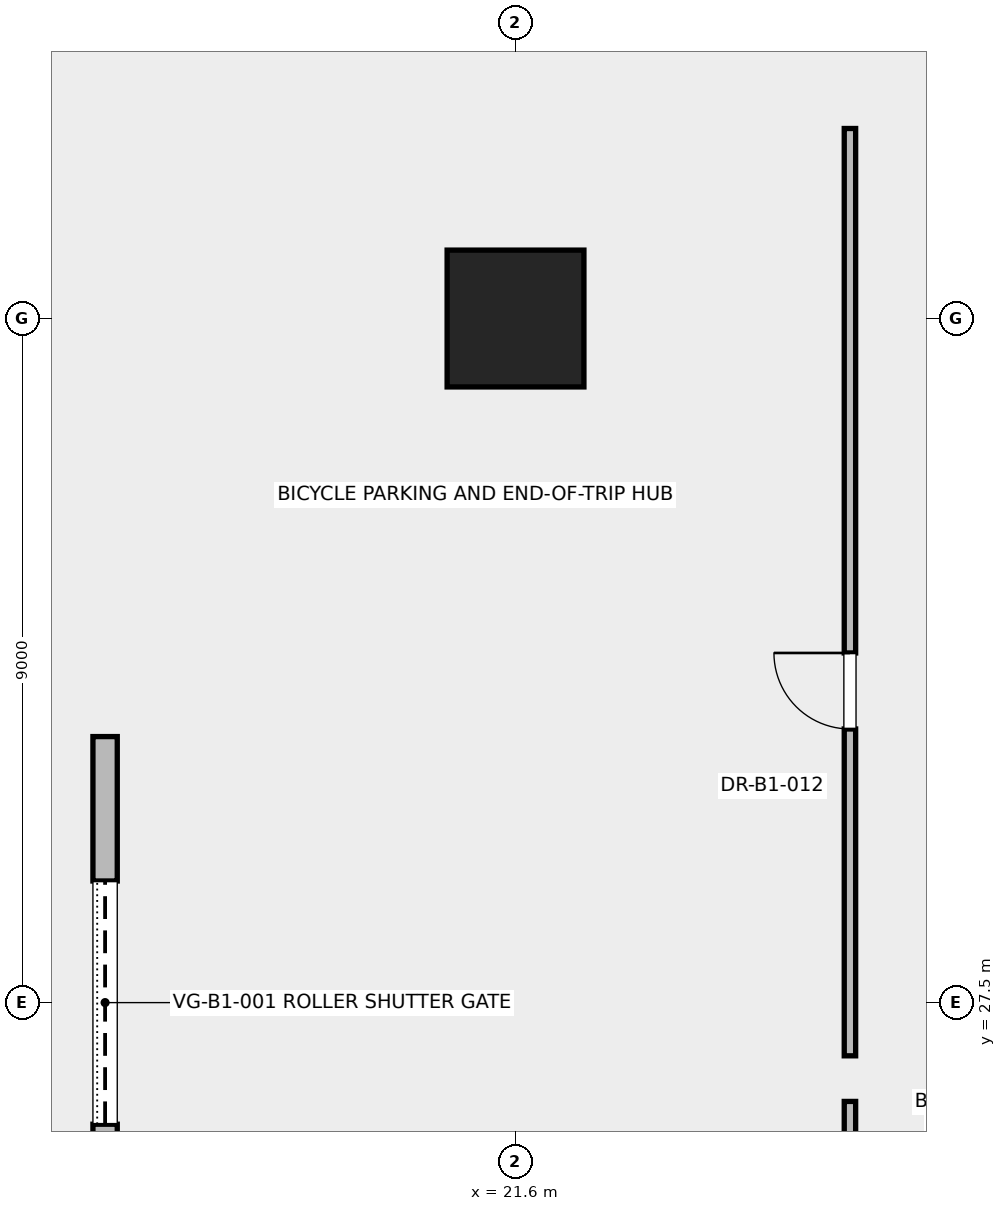
"""IFC4 building model, lengths in metres.
Left out: names, types, materials, properties, quantities, classifications, styles, units other than length and angle.
Written with IfcOpenShell. Run it as: python <this file> out.ifc"""

import sys

from ifc_helpers import new_model, si_unit, direction, frame, frame_2d, origin, origin_2d, place, context, subcontext, project, spatial, rectangle, extrude, element, fill, save


model = new_model("IFC4")
c1 = context("Model", 3, precision=1e-05, world=origin(), true_north=direction((0.0, 1.0)))
c2 = subcontext(c1, "Body", "Model", "MODEL_VIEW")
j1 = project(units=[si_unit("LENGTHUNIT", "METRE"), si_unit("PLANEANGLEUNIT", "RADIAN")], contexts=[c1])
p1 = place(None, origin())
s1 = spatial("IfcSite", under=j1, at=p1, CompositionType="ELEMENT")
p2 = place(p1, origin())
s2 = spatial("IfcBuilding", under=s1, at=p2, CompositionType="ELEMENT")
p3 = place(p2, frame((0.0, 0.0, -4.5)))
s3 = spatial("IfcBuildingStorey", under=s2, at=p3, CompositionType="ELEMENT", Elevation=-4.5)
p4 = place(p3, frame((21.6, 36.5, 0.0), z_axis=(0.0, 0.0, 1.0), x_axis=(1.0, 0.0, 0.0)))
e1 = element("IfcColumn", 1, at=p4, inside=s3, PredefinedType="COLUMN", context=c2, shape_type="SweptSolid", body=[
    extrude(rectangle(XDim=1.8, YDim=1.8, at=origin_2d()), origin(), (0.0, 0.0, 1.0), 4.5),
])
p5 = place(p3, frame((16.2, 24.0, 0.0), z_axis=(0.0, 0.0, 1.0), x_axis=(0.0, 1.0, 0.0)))
e2 = element("IfcWall", 2, at=p5, inside=s3, PredefinedType="SOLIDWALL", context=c2, shape_type="SweptSolid", body=[
    extrude(rectangle(XDim=7.0, YDim=0.32, at=frame_2d((3.5, 0.0))), origin(), (0.0, 0.0, 1.0), 4.22),
])
p6 = place(p5, frame((1.9, 0.0, 0.0)))
e3 = element("IfcOpeningElement", 3, at=p6, cuts=e2, PredefinedType="OPENING", context=c2, shape_type="SweptSolid", body=[
    extrude(rectangle(XDim=3.2, YDim=2.8, at=frame_2d((1.6, 1.4))), frame((0.0, 0.16, 0.0), z_axis=(0.0, -1.0, 0.0), x_axis=(1.0, 0.0, 0.0)), (0.0, 0.0, 1.0), 0.32),
])
p7 = place(p3, frame((26.0, 14.0, 0.0), z_axis=(0.0, 0.0, 1.0), x_axis=(0.0, 1.0, 0.0)))
e4 = element("IfcWall", 4, at=p7, inside=s3, PredefinedType="PARTITIONING", context=c2, shape_type="SweptSolid", body=[
    extrude(rectangle(XDim=12.2, YDim=0.15, at=frame_2d((6.1, 0.0))), origin(), (0.0, 0.0, 1.0), 2.85),
])
p8 = place(p7, frame((7.6, 0.0, 0.0)))
e5 = element("IfcOpeningElement", 5, at=p8, cuts=e4, PredefinedType="OPENING", context=c2, shape_type="SweptSolid", body=[
    extrude(rectangle(XDim=1.6, YDim=2.25, at=frame_2d((0.8, 1.125))), frame((0.0, 0.075, 0.0), z_axis=(0.0, -1.0, 0.0), x_axis=(1.0, 0.0, 0.0)), (0.0, 0.0, 1.0), 0.15),
])
p9 = place(p3, frame((26.0, 26.8, 0.0), z_axis=(0.0, 0.0, 1.0), x_axis=(0.0, 1.0, 0.0)))
e6 = element("IfcWall", 6, at=p9, inside=s3, PredefinedType="PARTITIONING", context=c2, shape_type="SweptSolid", body=[
    extrude(rectangle(XDim=12.2, YDim=0.15, at=frame_2d((6.1, 0.0))), origin(), (0.0, 0.0, 1.0), 2.85),
])
p10 = place(p9, frame((4.3, 0.0, 0.0)))
e7 = element("IfcOpeningElement", 7, at=p10, cuts=e6, PredefinedType="OPENING", context=c2, shape_type="SweptSolid", body=[
    extrude(rectangle(XDim=1.0, YDim=2.15, at=frame_2d((0.5, 1.075))), frame((0.0, 0.075, 0.0), z_axis=(0.0, -1.0, 0.0), x_axis=(1.0, 0.0, 0.0)), (0.0, 0.0, 1.0), 0.15),
])
p11 = place(p6, origin())
e8 = element("IfcDoor", 8, at=p11, inside=s3, OperationType="ROLLINGUP", PredefinedType="GATE", context=c2, shape_type="SweptSolid", body=[
    extrude(rectangle(XDim=3.2, YDim=2.8, at=frame_2d((1.6, 1.4))), frame((0.0, 0.025, 0.0), z_axis=(0.0, -1.0, 0.0), x_axis=(1.0, 0.0, 0.0)), (0.0, 0.0, 1.0), 0.05),
])
fill(e3, e8)
p12 = place(p10, origin())
e9 = element("IfcDoor", 9, at=p12, inside=s3, OperationType="SINGLE_SWING_RIGHT", PredefinedType="DOOR", context=c2, shape_type="SweptSolid", body=[
    extrude(rectangle(XDim=1.0, YDim=2.15, at=frame_2d((0.5, 1.075))), frame((0.0, 0.025, 0.0), z_axis=(0.0, -1.0, 0.0), x_axis=(1.0, 0.0, 0.0)), (0.0, 0.0, 1.0), 0.05),
])
fill(e7, e9)
save(model, sys.argv[1])
